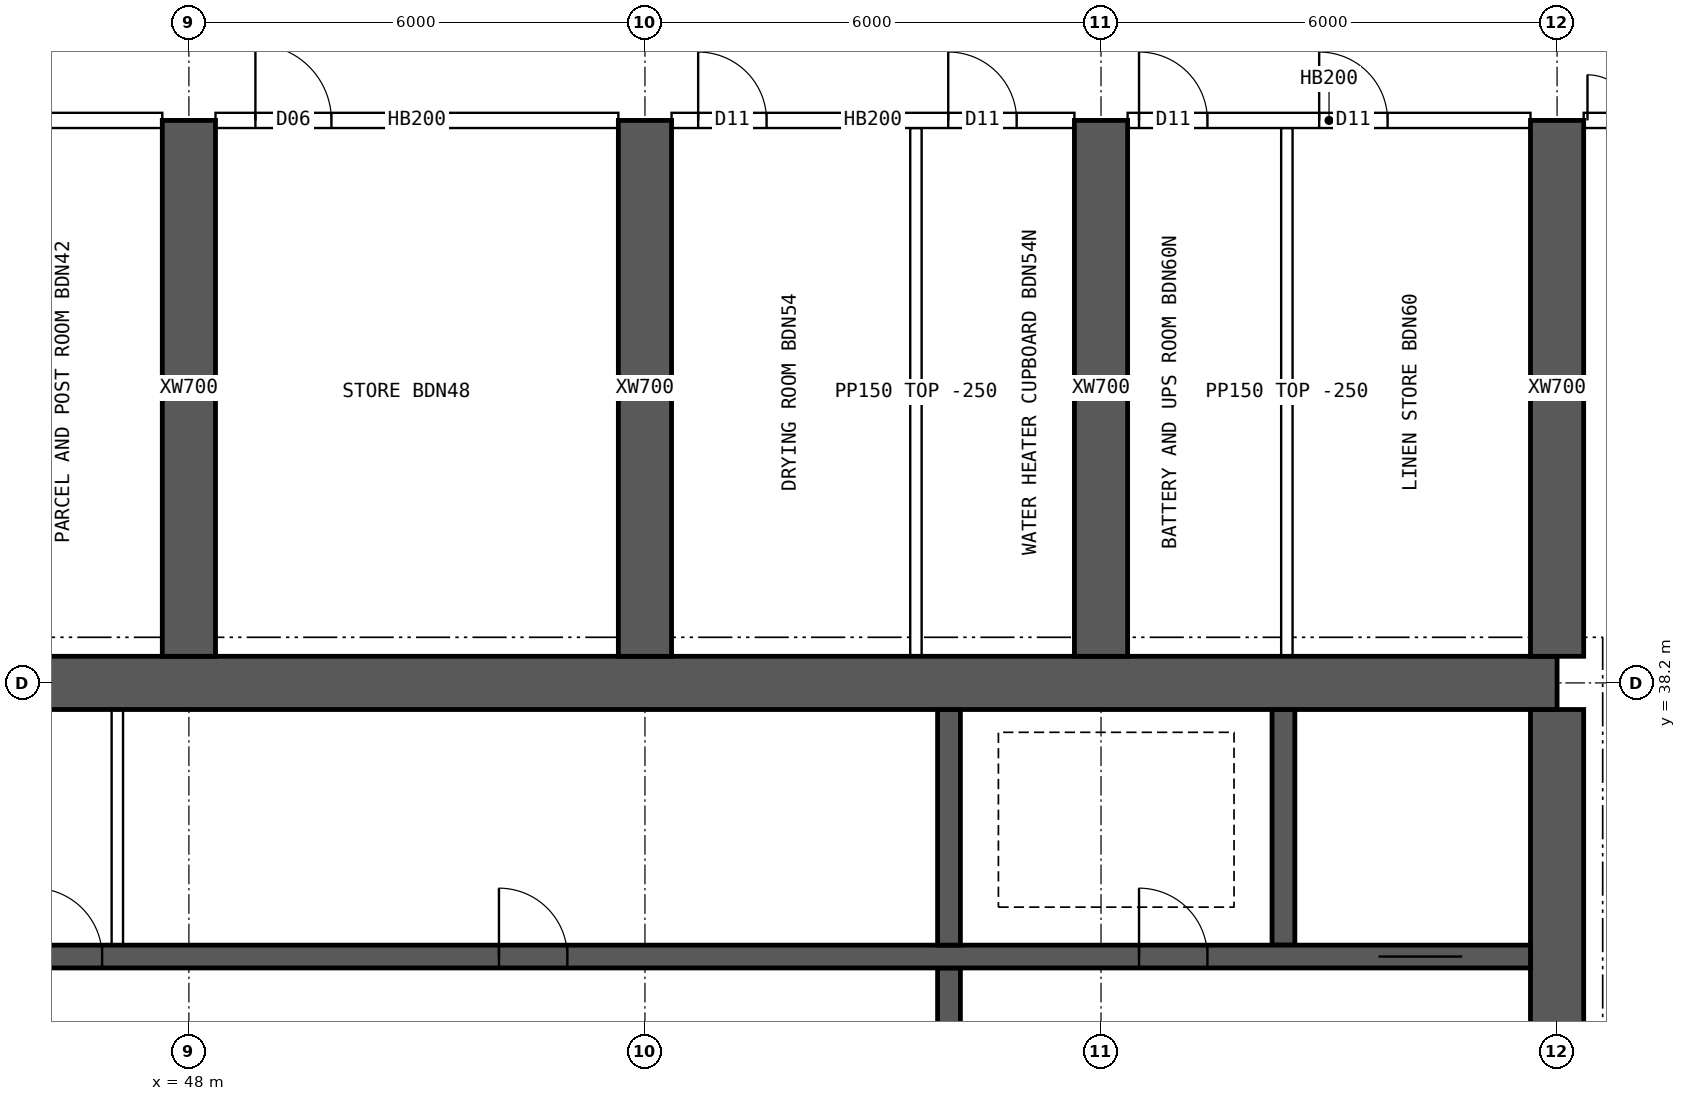
"""IFC4 building model, lengths in metres.
Left out: names, types, materials, properties, quantities, classifications, styles, units other than length and angle.
Written with IfcOpenShell. Run it as: python <this file> out.ifc"""

import sys

from ifc_helpers import new_model, si_unit, direction, frame, frame_2d, origin, place, context, subcontext, project, spatial, rectangle, extrude, element, fill, save


model = new_model("IFC4")
c1 = context("Model", 3, precision=1e-05, world=origin(), true_north=direction((0.0, 1.0)))
c2 = subcontext(c1, "Body", "Model", "MODEL_VIEW")
j1 = project(units=[si_unit("LENGTHUNIT", "METRE"), si_unit("PLANEANGLEUNIT", "RADIAN")], contexts=[c1])
p1 = place(None, origin())
s1 = spatial("IfcSite", under=j1, at=p1, CompositionType="ELEMENT")
p2 = place(p1, origin())
s2 = spatial("IfcBuilding", under=s1, at=p2, CompositionType="ELEMENT")
p3 = place(p2, frame((0.0, 0.0, 231.55)))
s3 = spatial("IfcBuildingStorey", under=s2, at=p3, CompositionType="ELEMENT", Elevation=231.55)
p4 = place(p3, frame((18.0, 38.2, 0.0), z_axis=(0.0, 0.0, 1.0), x_axis=(1.0, 0.0, 0.0)))
e1 = element("IfcWall", 1, at=p4, inside=s3, PredefinedType="SHEAR", context=c2, shape_type="SweptSolid", body=[
    extrude(rectangle(XDim=48.0, YDim=0.7, at=frame_2d((24.0, 0.0))), origin(), (0.0, 0.0, 1.0), 3.75),
])
p5 = place(p3, frame((66.0, 26.15, 0.0), z_axis=(0.0, 0.0, 1.0), x_axis=(0.0, 1.0, 0.0)))
e2 = element("IfcWall", 2, at=p5, inside=s3, PredefinedType="SHEAR", context=c2, shape_type="SweptSolid", body=[
    extrude(rectangle(XDim=11.7, YDim=0.7, at=frame_2d((5.85, 0.0))), origin(), (0.0, 0.0, 1.0), 3.75),
])
p6 = place(p5, frame((5.15, 0.0, 0.0)))
e3 = element("IfcOpeningElement", 3, at=p6, cuts=e2, PredefinedType="OPENING", context=c2, shape_type="SweptSolid", body=[
    extrude(rectangle(XDim=1.2, YDim=2.1, at=frame_2d((0.6, 1.05))), frame((0.0, 0.36, 0.0), z_axis=(0.0, -1.0, 0.0), x_axis=(1.0, 0.0, 0.0)), (0.0, 0.0, 1.0), 0.72),
])
p7 = place(p3, frame((18.35, 34.6, 0.0), z_axis=(0.0, 0.0, 1.0), x_axis=(1.0, 0.0, 0.0)))
e4 = element("IfcWall", 4, at=p7, inside=s3, PredefinedType="SHEAR", context=c2, shape_type="SweptSolid", body=[
    extrude(rectangle(XDim=47.3, YDim=0.3, at=frame_2d((23.65, 0.0))), origin(), (0.0, 0.0, 1.0), 3.75),
])
p8 = place(p7, frame((0.9, 0.0, 0.0)))
e5 = element("IfcOpeningElement", 5, at=p8, cuts=e4, PredefinedType="OPENING", context=c2, shape_type="SweptSolid", body=[
    extrude(rectangle(XDim=1.1, YDim=2.1, at=frame_2d((0.55, 1.05))), frame((0.0, 0.16, 0.0), z_axis=(0.0, -1.0, 0.0), x_axis=(1.0, 0.0, 0.0)), (0.0, 0.0, 1.0), 0.32),
])
p9 = place(p7, frame((45.3, 0.0, 0.0)))
e6 = element("IfcOpeningElement", 6, at=p9, cuts=e4, PredefinedType="OPENING", context=c2, shape_type="SweptSolid", body=[
    extrude(rectangle(XDim=1.1, YDim=2.1, at=frame_2d((0.55, 1.05))), frame((0.0, 0.16, 0.0), z_axis=(0.0, -1.0, 0.0), x_axis=(1.0, 0.0, 0.0)), (0.0, 0.0, 1.0), 0.32),
])
p10 = place(p7, frame((4.25, 0.0, 0.0)))
e7 = element("IfcOpeningElement", 7, at=p10, cuts=e4, PredefinedType="OPENING", context=c2, shape_type="SweptSolid", body=[
    extrude(rectangle(XDim=0.9, YDim=2.1, at=frame_2d((0.45, 1.05))), frame((0.0, 0.16, 0.0), z_axis=(0.0, -1.0, 0.0), x_axis=(1.0, 0.0, 0.0)), (0.0, 0.0, 1.0), 0.32),
])
p11 = place(p7, frame((42.15, 0.0, 0.0)))
e8 = element("IfcOpeningElement", 8, at=p11, cuts=e4, PredefinedType="OPENING", context=c2, shape_type="SweptSolid", body=[
    extrude(rectangle(XDim=0.9, YDim=2.1, at=frame_2d((0.45, 1.05))), frame((0.0, 0.16, 0.0), z_axis=(0.0, -1.0, 0.0), x_axis=(1.0, 0.0, 0.0)), (0.0, 0.0, 1.0), 0.32),
])
p12 = place(p7, frame((9.025, 0.0, 0.0)))
e9 = element("IfcOpeningElement", 9, at=p12, cuts=e4, PredefinedType="OPENING", context=c2, shape_type="SweptSolid", body=[
    extrude(rectangle(XDim=0.9, YDim=2.1, at=frame_2d((0.45, 1.05))), frame((0.0, 0.16, 0.0), z_axis=(0.0, -1.0, 0.0), x_axis=(1.0, 0.0, 0.0)), (0.0, 0.0, 1.0), 0.32),
])
p13 = place(p7, frame((12.999, 0.0, 0.0)))
e10 = element("IfcOpeningElement", 10, at=p13, cuts=e4, PredefinedType="OPENING", context=c2, shape_type="SweptSolid", body=[
    extrude(rectangle(XDim=0.9, YDim=2.1, at=frame_2d((0.45, 1.05))), frame((0.0, 0.16, 0.0), z_axis=(0.0, -1.0, 0.0), x_axis=(1.0, 0.0, 0.0)), (0.0, 0.0, 1.0), 0.32),
])
p14 = place(p7, frame((16.646, 0.0, 0.0)))
e11 = element("IfcOpeningElement", 11, at=p14, cuts=e4, PredefinedType="OPENING", context=c2, shape_type="SweptSolid", body=[
    extrude(rectangle(XDim=0.9, YDim=2.1, at=frame_2d((0.45, 1.05))), frame((0.0, 0.16, 0.0), z_axis=(0.0, -1.0, 0.0), x_axis=(1.0, 0.0, 0.0)), (0.0, 0.0, 1.0), 0.32),
])
p15 = place(p7, frame((20.405, 0.0, 0.0)))
e12 = element("IfcOpeningElement", 12, at=p15, cuts=e4, PredefinedType="OPENING", context=c2, shape_type="SweptSolid", body=[
    extrude(rectangle(XDim=0.9, YDim=2.1, at=frame_2d((0.45, 1.05))), frame((0.0, 0.16, 0.0), z_axis=(0.0, -1.0, 0.0), x_axis=(1.0, 0.0, 0.0)), (0.0, 0.0, 1.0), 0.32),
])
p16 = place(p7, frame((24.811, 0.0, 0.0)))
e13 = element("IfcOpeningElement", 13, at=p16, cuts=e4, PredefinedType="OPENING", context=c2, shape_type="SweptSolid", body=[
    extrude(rectangle(XDim=0.9, YDim=2.1, at=frame_2d((0.45, 1.05))), frame((0.0, 0.16, 0.0), z_axis=(0.0, -1.0, 0.0), x_axis=(1.0, 0.0, 0.0)), (0.0, 0.0, 1.0), 0.32),
])
p17 = place(p7, frame((27.608, 0.0, 0.0)))
e14 = element("IfcOpeningElement", 14, at=p17, cuts=e4, PredefinedType="OPENING", context=c2, shape_type="SweptSolid", body=[
    extrude(rectangle(XDim=0.9, YDim=2.1, at=frame_2d((0.45, 1.05))), frame((0.0, 0.16, 0.0), z_axis=(0.0, -1.0, 0.0), x_axis=(1.0, 0.0, 0.0)), (0.0, 0.0, 1.0), 0.32),
])
p18 = place(p7, frame((33.729, 0.0, 0.0)))
e15 = element("IfcOpeningElement", 15, at=p18, cuts=e4, PredefinedType="OPENING", context=c2, shape_type="SweptSolid", body=[
    extrude(rectangle(XDim=0.9, YDim=2.1, at=frame_2d((0.45, 1.05))), frame((0.0, 0.16, 0.0), z_axis=(0.0, -1.0, 0.0), x_axis=(1.0, 0.0, 0.0)), (0.0, 0.0, 1.0), 0.32),
])
p19 = place(p3, frame((58.0, 30.55, 0.0), z_axis=(0.0, 0.0, 1.0), x_axis=(0.0, 1.0, 0.0)))
e16 = element("IfcWall", 16, at=p19, inside=s3, PredefinedType="SHEAR", context=c2, shape_type="SweptSolid", body=[
    extrude(rectangle(XDim=3.9, YDim=0.3, at=frame_2d((1.95, 0.0))), origin(), (0.0, 0.0, 1.0), 3.75),
])
p20 = place(p19, frame((1.4, 0.0, 0.0)))
e17 = element("IfcOpeningElement", 17, at=p20, cuts=e16, PredefinedType="OPENING", context=c2, shape_type="SweptSolid", body=[
    extrude(rectangle(XDim=1.2, YDim=2.1, at=frame_2d((0.6, 1.05))), frame((0.0, 0.16, 0.0), z_axis=(0.0, -1.0, 0.0), x_axis=(1.0, 0.0, 0.0)), (0.0, 0.0, 1.0), 0.32),
])
for number, where, z_axis, x_axis in (
    (18, (62.4, 34.75, 0.0), (0.0, 0.0, 1.0), (0.0, 1.0, 0.0)),
    (19, (58.0, 34.75, 0.0), (0.0, 0.0, 1.0), (0.0, 1.0, 0.0)),
):
    element("IfcWall", number, at=place(p3, frame(where, z_axis=z_axis, x_axis=x_axis)), inside=s3, PredefinedType="SHEAR", context=c2, shape_type="SweptSolid", body=[
        extrude(rectangle(XDim=3.1, YDim=0.3, at=frame_2d((1.55, 0.0))), origin(), (0.0, 0.0, 1.0), 3.75),
    ])
for number, where, z_axis, x_axis in (
    (20, (48.0, 38.55, 0.0), (0.0, 0.0, 1.0), (0.0, 1.0, 0.0)),
    (21, (54.0, 38.55, 0.0), (0.0, 0.0, 1.0), (0.0, 1.0, 0.0)),
    (22, (60.0, 38.55, 0.0), (0.0, 0.0, 1.0), (0.0, 1.0, 0.0)),
    (23, (66.0, 38.55, 0.0), (0.0, 0.0, 1.0), (0.0, 1.0, 0.0)),
):
    element("IfcWall", number, at=place(p3, frame(where, z_axis=z_axis, x_axis=x_axis)), inside=s3, PredefinedType="SHEAR", context=c2, shape_type="SweptSolid", body=[
        extrude(rectangle(XDim=7.05, YDim=0.7, at=frame_2d((3.525, 0.0))), origin(), (0.0, 0.0, 1.0), 3.75),
    ])
p21 = place(p3, frame((47.058, 34.75, 0.0), z_axis=(0.0, 0.0, 1.0), x_axis=(0.0, 1.0, 0.0)))
e24 = element("IfcWall", 24, at=p21, inside=s3, PredefinedType="SOLIDWALL", context=c2, shape_type="SweptSolid", body=[
    extrude(rectangle(XDim=3.1, YDim=0.15, at=frame_2d((1.55, 0.0))), origin(), (0.0, 0.0, 1.0), 3.5),
])
p22 = place(p3, frame((42.35, 45.6, 0.0), z_axis=(0.0, 0.0, 1.0), x_axis=(1.0, 0.0, 0.0)))
e25 = element("IfcWall", 25, at=p22, inside=s3, PredefinedType="SOLIDWALL", context=c2, shape_type="SweptSolid", body=[
    extrude(rectangle(XDim=5.3, YDim=0.2, at=frame_2d((2.65, 0.0))), origin(), (0.0, 0.0, 1.0), 3.5),
])
p23 = place(p22, frame((0.35, 0.0, 0.0)))
e26 = element("IfcOpeningElement", 26, at=p23, cuts=e25, PredefinedType="OPENING", context=c2, shape_type="SweptSolid", body=[
    extrude(rectangle(XDim=0.9, YDim=2.1, at=frame_2d((0.45, 1.05))), frame((0.0, 0.11, 0.0), z_axis=(0.0, -1.0, 0.0), x_axis=(1.0, 0.0, 0.0)), (0.0, 0.0, 1.0), 0.22),
])
p24 = place(p22, frame((2.795, 0.0, 0.0)))
e27 = element("IfcOpeningElement", 27, at=p24, cuts=e25, PredefinedType="OPENING", context=c2, shape_type="SweptSolid", body=[
    extrude(rectangle(XDim=0.9, YDim=2.1, at=frame_2d((0.45, 1.05))), frame((0.0, 0.11, 0.0), z_axis=(0.0, -1.0, 0.0), x_axis=(1.0, 0.0, 0.0)), (0.0, 0.0, 1.0), 0.22),
])
p25 = place(p3, frame((48.35, 45.6, 0.0), z_axis=(0.0, 0.0, 1.0), x_axis=(1.0, 0.0, 0.0)))
e28 = element("IfcWall", 28, at=p25, inside=s3, PredefinedType="SOLIDWALL", context=c2, shape_type="SweptSolid", body=[
    extrude(rectangle(XDim=5.3, YDim=0.2, at=frame_2d((2.65, 0.0))), origin(), (0.0, 0.0, 1.0), 3.5),
])
p26 = place(p25, frame((0.525, 0.0, 0.0)))
e29 = element("IfcOpeningElement", 29, at=p26, cuts=e28, PredefinedType="OPENING", context=c2, shape_type="SweptSolid", body=[
    extrude(rectangle(XDim=1.0, YDim=2.1, at=frame_2d((0.5, 1.05))), frame((0.0, 0.11, 0.0), z_axis=(0.0, -1.0, 0.0), x_axis=(1.0, 0.0, 0.0)), (0.0, 0.0, 1.0), 0.22),
])
p27 = place(p3, frame((54.35, 45.6, 0.0), z_axis=(0.0, 0.0, 1.0), x_axis=(1.0, 0.0, 0.0)))
e30 = element("IfcWall", 30, at=p27, inside=s3, PredefinedType="SOLIDWALL", context=c2, shape_type="SweptSolid", body=[
    extrude(rectangle(XDim=5.3, YDim=0.2, at=frame_2d((2.65, 0.0))), origin(), (0.0, 0.0, 1.0), 3.5),
])
p28 = place(p27, frame((0.35, 0.0, 0.0)))
e31 = element("IfcOpeningElement", 31, at=p28, cuts=e30, PredefinedType="OPENING", context=c2, shape_type="SweptSolid", body=[
    extrude(rectangle(XDim=0.9, YDim=2.1, at=frame_2d((0.45, 1.05))), frame((0.0, 0.11, 0.0), z_axis=(0.0, -1.0, 0.0), x_axis=(1.0, 0.0, 0.0)), (0.0, 0.0, 1.0), 0.22),
])
p29 = place(p27, frame((3.64, 0.0, 0.0)))
e32 = element("IfcOpeningElement", 32, at=p29, cuts=e30, PredefinedType="OPENING", context=c2, shape_type="SweptSolid", body=[
    extrude(rectangle(XDim=0.9, YDim=2.1, at=frame_2d((0.45, 1.05))), frame((0.0, 0.11, 0.0), z_axis=(0.0, -1.0, 0.0), x_axis=(1.0, 0.0, 0.0)), (0.0, 0.0, 1.0), 0.22),
])
p30 = place(p3, frame((60.35, 45.6, 0.0), z_axis=(0.0, 0.0, 1.0), x_axis=(1.0, 0.0, 0.0)))
e33 = element("IfcWall", 33, at=p30, inside=s3, PredefinedType="SOLIDWALL", context=c2, shape_type="SweptSolid", body=[
    extrude(rectangle(XDim=5.3, YDim=0.2, at=frame_2d((2.65, 0.0))), origin(), (0.0, 0.0, 1.0), 3.5),
])
p31 = place(p30, frame((0.15, 0.0, 0.0)))
e34 = element("IfcOpeningElement", 34, at=p31, cuts=e33, PredefinedType="OPENING", context=c2, shape_type="SweptSolid", body=[
    extrude(rectangle(XDim=0.9, YDim=2.1, at=frame_2d((0.45, 1.05))), frame((0.0, 0.11, 0.0), z_axis=(0.0, -1.0, 0.0), x_axis=(1.0, 0.0, 0.0)), (0.0, 0.0, 1.0), 0.22),
])
p32 = place(p30, frame((2.52, 0.0, 0.0)))
e35 = element("IfcOpeningElement", 35, at=p32, cuts=e33, PredefinedType="OPENING", context=c2, shape_type="SweptSolid", body=[
    extrude(rectangle(XDim=0.9, YDim=2.1, at=frame_2d((0.45, 1.05))), frame((0.0, 0.11, 0.0), z_axis=(0.0, -1.0, 0.0), x_axis=(1.0, 0.0, 0.0)), (0.0, 0.0, 1.0), 0.22),
])
p33 = place(p3, frame((66.35, 45.6, 0.0), z_axis=(0.0, 0.0, 1.0), x_axis=(1.0, 0.0, 0.0)))
e36 = element("IfcWall", 36, at=p33, inside=s3, PredefinedType="SOLIDWALL", context=c2, shape_type="SweptSolid", body=[
    extrude(rectangle(XDim=2.05, YDim=0.2, at=frame_2d((1.025, 0.0))), origin(), (0.0, 0.0, 1.0), 3.5),
])
p34 = place(p33, frame((0.05, 0.0, 0.0)))
e37 = element("IfcOpeningElement", 37, at=p34, cuts=e36, PredefinedType="OPENING", context=c2, shape_type="SweptSolid", body=[
    extrude(rectangle(XDim=1.2, YDim=2.1, at=frame_2d((0.6, 1.05))), frame((0.0, 0.11, 0.0), z_axis=(0.0, -1.0, 0.0), x_axis=(1.0, 0.0, 0.0)), (0.0, 0.0, 1.0), 0.22),
])
for number, where, z_axis, x_axis in (
    (38, (57.565, 38.55, 0.0), (0.0, 0.0, 1.0), (0.0, 1.0, 0.0)),
    (39, (62.445, 38.55, 0.0), (0.0, 0.0, 1.0), (0.0, 1.0, 0.0)),
):
    element("IfcWall", number, at=place(p3, frame(where, z_axis=z_axis, x_axis=x_axis)), inside=s3, PredefinedType="PARTITIONING", context=c2, shape_type="SweptSolid", body=[
        extrude(rectangle(XDim=6.95, YDim=0.15, at=frame_2d((3.475, 0.0))), origin(), (0.0, 0.0, 1.0), 3.5),
    ])
p35 = place(p9, origin())
e40 = element("IfcDoor", 40, at=p35, inside=s3, OperationType="DOUBLE_DOOR_SLIDING", PredefinedType="DOOR", context=c2, shape_type="SweptSolid", body=[
    extrude(rectangle(XDim=1.1, YDim=2.1, at=frame_2d((0.55, 1.05))), frame((0.0, 0.025, 0.0), z_axis=(0.0, -1.0, 0.0), x_axis=(1.0, 0.0, 0.0)), (0.0, 0.0, 1.0), 0.05),
])
fill(e6, e40)
p36 = place(p11, origin())
e41 = element("IfcDoor", 41, at=p36, inside=s3, OperationType="SINGLE_SWING_LEFT", PredefinedType="DOOR", context=c2, shape_type="SweptSolid", body=[
    extrude(rectangle(XDim=0.9, YDim=2.1, at=frame_2d((0.45, 1.05))), frame((0.0, 0.025, 0.0), z_axis=(0.0, -1.0, 0.0), x_axis=(1.0, 0.0, 0.0)), (0.0, 0.0, 1.0), 0.05),
])
fill(e8, e41)
p37 = place(p17, origin())
e42 = element("IfcDoor", 42, at=p37, inside=s3, OperationType="SINGLE_SWING_LEFT", PredefinedType="DOOR", context=c2, shape_type="SweptSolid", body=[
    extrude(rectangle(XDim=0.9, YDim=2.1, at=frame_2d((0.45, 1.05))), frame((0.0, 0.025, 0.0), z_axis=(0.0, -1.0, 0.0), x_axis=(1.0, 0.0, 0.0)), (0.0, 0.0, 1.0), 0.05),
])
fill(e14, e42)
p38 = place(p18, origin())
e43 = element("IfcDoor", 43, at=p38, inside=s3, OperationType="SINGLE_SWING_LEFT", PredefinedType="DOOR", context=c2, shape_type="SweptSolid", body=[
    extrude(rectangle(XDim=0.9, YDim=2.1, at=frame_2d((0.45, 1.05))), frame((0.0, 0.025, 0.0), z_axis=(0.0, -1.0, 0.0), x_axis=(1.0, 0.0, 0.0)), (0.0, 0.0, 1.0), 0.05),
])
fill(e15, e43)
p39 = place(p34, origin())
e44 = element("IfcDoor", 44, at=p39, inside=s3, OperationType="DOUBLE_DOOR_SINGLE_SWING", PredefinedType="DOOR", context=c2, shape_type="SweptSolid", body=[
    extrude(rectangle(XDim=1.2, YDim=2.1, at=frame_2d((0.6, 1.05))), frame((0.0, 0.025, 0.0), z_axis=(0.0, -1.0, 0.0), x_axis=(1.0, 0.0, 0.0)), (0.0, 0.0, 1.0), 0.05),
])
fill(e37, e44)
p40 = place(p26, origin())
e45 = element("IfcDoor", 45, at=p40, inside=s3, OperationType="SINGLE_SWING_LEFT", PredefinedType="DOOR", context=c2, shape_type="SweptSolid", body=[
    extrude(rectangle(XDim=1.0, YDim=2.1, at=frame_2d((0.5, 1.05))), frame((0.0, 0.025, 0.0), z_axis=(0.0, -1.0, 0.0), x_axis=(1.0, 0.0, 0.0)), (0.0, 0.0, 1.0), 0.05),
])
fill(e29, e45)
p41 = place(p28, origin())
e46 = element("IfcDoor", 46, at=p41, inside=s3, OperationType="SINGLE_SWING_LEFT", PredefinedType="DOOR", context=c2, shape_type="SweptSolid", body=[
    extrude(rectangle(XDim=0.9, YDim=2.1, at=frame_2d((0.45, 1.05))), frame((0.0, 0.025, 0.0), z_axis=(0.0, -1.0, 0.0), x_axis=(1.0, 0.0, 0.0)), (0.0, 0.0, 1.0), 0.05),
])
fill(e31, e46)
p42 = place(p29, origin())
e47 = element("IfcDoor", 47, at=p42, inside=s3, OperationType="SINGLE_SWING_LEFT", PredefinedType="DOOR", context=c2, shape_type="SweptSolid", body=[
    extrude(rectangle(XDim=0.9, YDim=2.1, at=frame_2d((0.45, 1.05))), frame((0.0, 0.025, 0.0), z_axis=(0.0, -1.0, 0.0), x_axis=(1.0, 0.0, 0.0)), (0.0, 0.0, 1.0), 0.05),
])
fill(e32, e47)
p43 = place(p31, origin())
e48 = element("IfcDoor", 48, at=p43, inside=s3, OperationType="SINGLE_SWING_LEFT", PredefinedType="DOOR", context=c2, shape_type="SweptSolid", body=[
    extrude(rectangle(XDim=0.9, YDim=2.1, at=frame_2d((0.45, 1.05))), frame((0.0, 0.025, 0.0), z_axis=(0.0, -1.0, 0.0), x_axis=(1.0, 0.0, 0.0)), (0.0, 0.0, 1.0), 0.05),
])
fill(e34, e48)
p44 = place(p32, origin())
e49 = element("IfcDoor", 49, at=p44, inside=s3, OperationType="SINGLE_SWING_LEFT", PredefinedType="DOOR", context=c2, shape_type="SweptSolid", body=[
    extrude(rectangle(XDim=0.9, YDim=2.1, at=frame_2d((0.45, 1.05))), frame((0.0, 0.025, 0.0), z_axis=(0.0, -1.0, 0.0), x_axis=(1.0, 0.0, 0.0)), (0.0, 0.0, 1.0), 0.05),
])
fill(e35, e49)
save(model, sys.argv[1])
